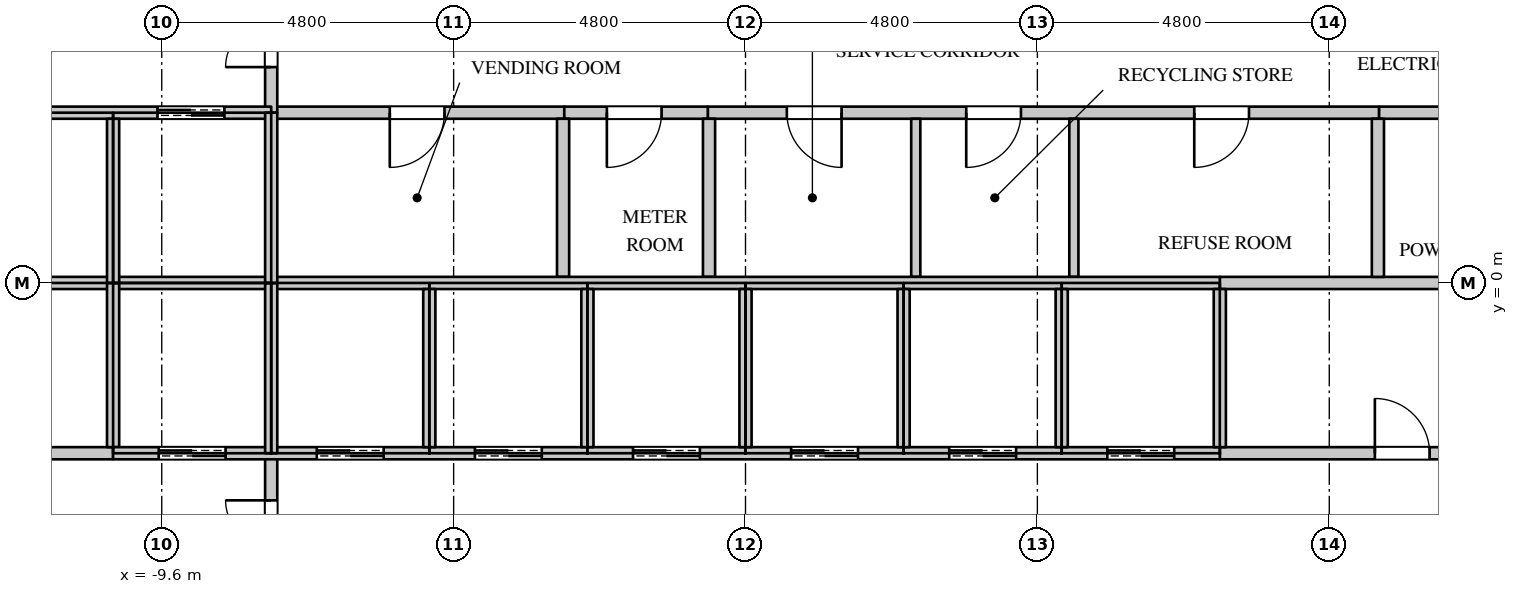
"""IFC4 building model, lengths in metres.
Left out: names, types, materials, properties, quantities, classifications, styles, units other than length and angle.
Written with IfcOpenShell. Run it as: python <this file> out.ifc"""

import sys

from ifc_helpers import new_model, si_unit, direction, frame, frame_2d, origin, place, context, subcontext, project, spatial, rectangle, extrude, element, fill, save


model = new_model("IFC4")
c1 = context("Model", 3, precision=1e-05, world=origin(), true_north=direction((0.0, 1.0)))
c2 = subcontext(c1, "Body", "Model", "MODEL_VIEW")
j1 = project(units=[si_unit("LENGTHUNIT", "METRE"), si_unit("PLANEANGLEUNIT", "RADIAN")], contexts=[c1])
p1 = place(None, origin())
s1 = spatial("IfcSite", under=j1, at=p1, CompositionType="ELEMENT")
p2 = place(p1, origin())
s2 = spatial("IfcBuilding", under=s1, at=p2, CompositionType="ELEMENT")
p3 = place(p2, frame((0.0, 0.0, 226.5)))
s3 = spatial("IfcBuildingStorey", under=s2, at=p3, CompositionType="ELEMENT", Elevation=226.5)
p4 = place(p3, frame((-7.8, 2.8, 0.0), z_axis=(0.0, 0.0, 1.0), x_axis=(1.0, 0.0, 0.0)))
e1 = element("IfcWall", 1, at=p4, inside=s3, PredefinedType="PARTITIONING", context=c2, shape_type="SweptSolid", body=[
    extrude(rectangle(XDim=4.82, YDim=0.2, at=frame_2d((2.41, 0.0))), origin(), (0.0, 0.0, 1.0), 3.95),
])
p5 = place(p4, frame((1.95, 0.0, 0.0)))
e2 = element("IfcOpeningElement", 2, at=p5, cuts=e1, PredefinedType="OPENING", context=c2, shape_type="SweptSolid", body=[
    extrude(rectangle(XDim=0.9, YDim=2.2, at=frame_2d((0.45, 1.1))), frame((0.0, 0.11, 0.0), z_axis=(0.0, -1.0, 0.0), x_axis=(1.0, 0.0, 0.0)), (0.0, 0.0, 1.0), 0.22),
])
p6 = place(p3, frame((-7.8, -8.075, 0.0), z_axis=(0.0, 0.0, 1.0), x_axis=(0.0, 1.0, 0.0)))
e3 = element("IfcWall", 3, at=p6, inside=s3, PredefinedType="PARTITIONING", context=c2, shape_type="SweptSolid", body=[
    extrude(rectangle(XDim=5.275, YDim=0.2, at=frame_2d((2.637, 0.0))), origin(), (0.0, 0.0, 1.0), 3.95),
])
p7 = place(p6, frame((3.0, 0.0, 0.0)))
e4 = element("IfcOpeningElement", 4, at=p7, cuts=e3, PredefinedType="OPENING", context=c2, shape_type="SweptSolid", body=[
    extrude(rectangle(XDim=1.5, YDim=2.4, at=frame_2d((0.75, 1.2))), frame((0.0, 0.11, 0.0), z_axis=(0.0, -1.0, 0.0), x_axis=(1.0, 0.0, 0.0)), (0.0, 0.0, 1.0), 0.22),
])
p8 = place(p3, frame((-7.8, 2.8, 0.0), z_axis=(0.0, 0.0, 1.0), x_axis=(0.0, 1.0, 0.0)))
e5 = element("IfcWall", 5, at=p8, inside=s3, PredefinedType="PARTITIONING", context=c2, shape_type="SweptSolid", body=[
    extrude(rectangle(XDim=5.275, YDim=0.2, at=frame_2d((2.637, 0.0))), origin(), (0.0, 0.0, 1.0), 3.95),
])
p9 = place(p8, frame((0.75, 0.0, 0.0)))
e6 = element("IfcOpeningElement", 6, at=p9, cuts=e5, PredefinedType="OPENING", context=c2, shape_type="SweptSolid", body=[
    extrude(rectangle(XDim=1.5, YDim=2.4, at=frame_2d((0.75, 1.2))), frame((0.0, 0.11, 0.0), z_axis=(0.0, -1.0, 0.0), x_axis=(1.0, 0.0, 0.0)), (0.0, 0.0, 1.0), 0.22),
])
p10 = place(p3, frame((-0.62, 2.8, 0.0), z_axis=(0.0, 0.0, 1.0), x_axis=(1.0, 0.0, 0.0)))
e7 = element("IfcWall", 7, at=p10, inside=s3, PredefinedType="PARTITIONING", context=c2, shape_type="SweptSolid", body=[
    extrude(rectangle(XDim=11.04, YDim=0.2, at=frame_2d((5.52, 0.0))), origin(), (0.0, 0.0, 1.0), 3.95),
])
p11 = place(p10, frame((1.3, 0.0, 0.0)))
e8 = element("IfcOpeningElement", 8, at=p11, cuts=e7, PredefinedType="OPENING", context=c2, shape_type="SweptSolid", body=[
    extrude(rectangle(XDim=0.9, YDim=2.2, at=frame_2d((0.45, 1.1))), frame((0.0, 0.11, 0.0), z_axis=(0.0, -1.0, 0.0), x_axis=(1.0, 0.0, 0.0)), (0.0, 0.0, 1.0), 0.22),
])
p12 = place(p10, frame((4.25, 0.0, 0.0)))
e9 = element("IfcOpeningElement", 9, at=p12, cuts=e7, PredefinedType="OPENING", context=c2, shape_type="SweptSolid", body=[
    extrude(rectangle(XDim=0.9, YDim=2.2, at=frame_2d((0.45, 1.1))), frame((0.0, 0.11, 0.0), z_axis=(0.0, -1.0, 0.0), x_axis=(1.0, 0.0, 0.0)), (0.0, 0.0, 1.0), 0.22),
])
p13 = place(p10, frame((8.0, 0.0, 0.0)))
e10 = element("IfcOpeningElement", 10, at=p13, cuts=e7, PredefinedType="OPENING", context=c2, shape_type="SweptSolid", body=[
    extrude(rectangle(XDim=0.9, YDim=2.2, at=frame_2d((0.45, 1.1))), frame((0.0, 0.11, 0.0), z_axis=(0.0, -1.0, 0.0), x_axis=(1.0, 0.0, 0.0)), (0.0, 0.0, 1.0), 0.22),
])
for number, where, z_axis, x_axis in (
    (11, (2.8, 0.1, 0.0), (0.0, 0.0, 1.0), (0.0, 1.0, 0.0)),
    (12, (5.4, 0.1, 0.0), (0.0, 0.0, 1.0), (0.0, 1.0, 0.0)),
):
    element("IfcWall", number, at=place(p3, frame(where, z_axis=z_axis, x_axis=x_axis)), inside=s3, PredefinedType="PARTITIONING", context=c2, shape_type="SweptSolid", body=[
        extrude(rectangle(XDim=2.6, YDim=0.15, at=frame_2d((1.3, 0.0))), origin(), (0.0, 0.0, 1.0), 3.95),
    ])
p14 = place(p3, frame((-13.77, -2.8, 0.0), z_axis=(0.0, 0.0, 1.0), x_axis=(1.0, 0.0, 0.0)))
e13 = element("IfcWall", 13, at=p14, inside=s3, PredefinedType="PARTITIONING", context=c2, shape_type="SweptSolid", body=[
    extrude(rectangle(XDim=3.37, YDim=0.2, at=frame_2d((1.685, 0.0))), origin(), (0.0, 0.0, 1.0), 3.95),
])
p15 = place(p14, frame((1.35, 0.0, 0.0)))
e14 = element("IfcOpeningElement", 14, at=p15, cuts=e13, PredefinedType="OPENING", context=c2, shape_type="SweptSolid", body=[
    extrude(rectangle(XDim=0.6, YDim=2.0, at=frame_2d((0.3, 1.0))), frame((0.0, 0.11, 0.0), z_axis=(0.0, -1.0, 0.0), x_axis=(1.0, 0.0, 0.0)), (0.0, 0.0, 1.0), 0.22),
])
p16 = place(p3, frame((-2.98, 2.8, 0.0), z_axis=(0.0, 0.0, 1.0), x_axis=(1.0, 0.0, 0.0)))
e15 = element("IfcWall", 15, at=p16, inside=s3, PredefinedType="PARTITIONING", context=c2, shape_type="SweptSolid", body=[
    extrude(rectangle(XDim=2.36, YDim=0.2, at=frame_2d((1.18, 0.0))), origin(), (0.0, 0.0, 1.0), 3.95),
])
p17 = place(p16, frame((0.7, 0.0, 0.0)))
e16 = element("IfcOpeningElement", 16, at=p17, cuts=e15, PredefinedType="OPENING", context=c2, shape_type="SweptSolid", body=[
    extrude(rectangle(XDim=0.9, YDim=2.2, at=frame_2d((0.45, 1.1))), frame((0.0, 0.11, 0.0), z_axis=(0.0, -1.0, 0.0), x_axis=(1.0, 0.0, 0.0)), (0.0, 0.0, 1.0), 0.22),
])
for number, where, z_axis, x_axis in (
    (17, (-3.0, 0.1, 0.0), (0.0, 0.0, 1.0), (0.0, 1.0, 0.0)),
    (18, (-0.6, 0.1, 0.0), (0.0, 0.0, 1.0), (0.0, 1.0, 0.0)),
):
    element("IfcWall", number, at=place(p3, frame(where, z_axis=z_axis, x_axis=x_axis)), inside=s3, PredefinedType="PARTITIONING", context=c2, shape_type="SweptSolid", body=[
        extrude(rectangle(XDim=2.6, YDim=0.2, at=frame_2d((1.3, 0.0))), origin(), (0.0, 0.0, 1.0), 3.95),
    ])
p18 = place(p3, frame((7.8, -2.8, 0.0), z_axis=(0.0, 0.0, 1.0), x_axis=(1.0, 0.0, 0.0)))
e19 = element("IfcWall", 19, at=p18, inside=s3, PredefinedType="PARTITIONING", context=c2, shape_type="SweptSolid", body=[
    extrude(rectangle(XDim=5.97, YDim=0.2, at=frame_2d((2.985, 0.0))), origin(), (0.0, 0.0, 1.0), 3.95),
])
p19 = place(p18, frame((2.55, 0.0, 0.0)))
e20 = element("IfcOpeningElement", 20, at=p19, cuts=e19, PredefinedType="OPENING", context=c2, shape_type="SweptSolid", body=[
    extrude(rectangle(XDim=0.9, YDim=2.2, at=frame_2d((0.45, 1.1))), frame((0.0, 0.11, 0.0), z_axis=(0.0, -1.0, 0.0), x_axis=(1.0, 0.0, 0.0)), (0.0, 0.0, 1.0), 0.22),
])
p20 = place(p3, frame((7.8, 0.0, 0.0), z_axis=(0.0, 0.0, 1.0), x_axis=(1.0, 0.0, 0.0)))
e21 = element("IfcWall", 21, at=p20, inside=s3, PredefinedType="PARTITIONING", context=c2, shape_type="SweptSolid", body=[
    extrude(rectangle(XDim=5.97, YDim=0.2, at=frame_2d((2.985, 0.0))), origin(), (0.0, 0.0, 1.0), 3.95),
])
p21 = place(p3, frame((10.42, 2.8, 0.0), z_axis=(0.0, 0.0, 1.0), x_axis=(1.0, 0.0, 0.0)))
e22 = element("IfcWall", 22, at=p21, inside=s3, PredefinedType="PARTITIONING", context=c2, shape_type="SweptSolid", body=[
    extrude(rectangle(XDim=3.35, YDim=0.2, at=frame_2d((1.675, 0.0))), origin(), (0.0, 0.0, 1.0), 3.95),
])
p22 = place(p21, frame((1.35, 0.0, 0.0)))
e23 = element("IfcOpeningElement", 23, at=p22, cuts=e22, PredefinedType="OPENING", context=c2, shape_type="SweptSolid", body=[
    extrude(rectangle(XDim=0.6, YDim=2.0, at=frame_2d((0.3, 1.0))), frame((0.0, 0.11, 0.0), z_axis=(0.0, -1.0, 0.0), x_axis=(1.0, 0.0, 0.0)), (0.0, 0.0, 1.0), 0.22),
])
p23 = place(p3, frame((10.4, 0.1, 0.0), z_axis=(0.0, 0.0, 1.0), x_axis=(0.0, 1.0, 0.0)))
e24 = element("IfcWall", 24, at=p23, inside=s3, PredefinedType="PARTITIONING", context=c2, shape_type="SweptSolid", body=[
    extrude(rectangle(XDim=2.6, YDim=0.2, at=frame_2d((1.3, 0.0))), origin(), (0.0, 0.0, 1.0), 3.95),
])
p24 = place(p3, frame((-13.77, 0.0, 0.0), z_axis=(0.0, 0.0, 1.0), x_axis=(1.0, 0.0, 0.0)))
e25 = element("IfcWall", 25, at=p24, inside=s3, PredefinedType="PARTITIONING", context=c2, shape_type="SweptSolid", body=[
    extrude(rectangle(XDim=21.57, YDim=0.2, at=frame_2d((10.785, 0.0))), origin(), (0.0, 0.0, 1.0), 3.95),
])
p25 = place(p3, frame((-13.77, 2.8, 0.0), z_axis=(0.0, 0.0, 1.0), x_axis=(1.0, 0.0, 0.0)))
e26 = element("IfcWall", 26, at=p25, inside=s3, PredefinedType="PARTITIONING", context=c2, shape_type="SweptSolid", body=[
    extrude(rectangle(XDim=5.97, YDim=0.2, at=frame_2d((2.985, 0.0))), origin(), (0.0, 0.0, 1.0), 3.95),
])
p26 = place(p25, frame((1.1, 0.0, 0.0)))
e27 = element("IfcOpeningElement", 27, at=p26, cuts=e26, PredefinedType="OPENING", context=c2, shape_type="SweptSolid", body=[
    extrude(rectangle(XDim=1.1, YDim=2.2, at=frame_2d((0.55, 1.1))), frame((0.0, 0.11, 0.0), z_axis=(0.0, -1.0, 0.0), x_axis=(1.0, 0.0, 0.0)), (0.0, 0.0, 1.0), 0.22),
])
p27 = place(p25, frame((4.1, 0.0, 0.0)))
e28 = element("IfcOpeningElement", 28, at=p27, cuts=e26, PredefinedType="OPENING", context=c2, shape_type="SweptSolid", body=[
    extrude(rectangle(XDim=1.1, YDim=2.2, at=frame_2d((0.55, 1.1))), frame((0.0, 0.11, 0.0), z_axis=(0.0, -1.0, 0.0), x_axis=(1.0, 0.0, 0.0)), (0.0, 0.0, 1.0), 0.22),
])
p28 = place(p3, frame((-10.4, -2.7, 0.0), z_axis=(0.0, 0.0, 1.0), x_axis=(0.0, 1.0, 0.0)))
e29 = element("IfcWall", 29, at=p28, inside=s3, PredefinedType="PARTITIONING", context=c2, shape_type="SweptSolid", body=[
    extrude(rectangle(XDim=2.7, YDim=0.2, at=frame_2d((1.35, 0.0))), origin(), (0.0, 0.0, 1.0), 3.95),
])
p29 = place(p3, frame((-10.4, -2.8, 0.0), z_axis=(0.0, 0.0, 1.0), x_axis=(1.0, 0.0, 0.0)))
e30 = element("IfcWall", 30, at=p29, inside=s3, PredefinedType="PARTITIONING", context=c2, shape_type="SweptSolid", body=[
    extrude(rectangle(XDim=18.2, YDim=0.2, at=frame_2d((9.1, 0.0))), origin(), (0.0, 0.0, 1.0), 3.95),
])
p30 = place(p29, frame((0.75, 0.0, 0.0)))
e31 = element("IfcOpeningElement", 31, at=p30, cuts=e30, PredefinedType="OPENING", context=c2, shape_type="SweptSolid", body=[
    extrude(rectangle(XDim=1.1, YDim=2.2, at=frame_2d((0.55, 1.1))), frame((0.0, 0.11, 0.0), z_axis=(0.0, -1.0, 0.0), x_axis=(1.0, 0.0, 0.0)), (0.0, 0.0, 1.0), 0.22),
])
p31 = place(p29, frame((3.35, 0.0, 0.0)))
e32 = element("IfcOpeningElement", 32, at=p31, cuts=e30, PredefinedType="OPENING", context=c2, shape_type="SweptSolid", body=[
    extrude(rectangle(XDim=1.1, YDim=2.2, at=frame_2d((0.55, 1.1))), frame((0.0, 0.11, 0.0), z_axis=(0.0, -1.0, 0.0), x_axis=(1.0, 0.0, 0.0)), (0.0, 0.0, 1.0), 0.22),
])
p32 = place(p29, frame((5.95, 0.0, 0.0)))
e33 = element("IfcOpeningElement", 33, at=p32, cuts=e30, PredefinedType="OPENING", context=c2, shape_type="SweptSolid", body=[
    extrude(rectangle(XDim=1.1, YDim=2.2, at=frame_2d((0.55, 1.1))), frame((0.0, 0.11, 0.0), z_axis=(0.0, -1.0, 0.0), x_axis=(1.0, 0.0, 0.0)), (0.0, 0.0, 1.0), 0.22),
])
p33 = place(p29, frame((8.55, 0.0, 0.0)))
e34 = element("IfcOpeningElement", 34, at=p33, cuts=e30, PredefinedType="OPENING", context=c2, shape_type="SweptSolid", body=[
    extrude(rectangle(XDim=1.1, YDim=2.2, at=frame_2d((0.55, 1.1))), frame((0.0, 0.11, 0.0), z_axis=(0.0, -1.0, 0.0), x_axis=(1.0, 0.0, 0.0)), (0.0, 0.0, 1.0), 0.22),
])
p34 = place(p29, frame((11.15, 0.0, 0.0)))
e35 = element("IfcOpeningElement", 35, at=p34, cuts=e30, PredefinedType="OPENING", context=c2, shape_type="SweptSolid", body=[
    extrude(rectangle(XDim=1.1, YDim=2.2, at=frame_2d((0.55, 1.1))), frame((0.0, 0.11, 0.0), z_axis=(0.0, -1.0, 0.0), x_axis=(1.0, 0.0, 0.0)), (0.0, 0.0, 1.0), 0.22),
])
p35 = place(p29, frame((13.75, 0.0, 0.0)))
e36 = element("IfcOpeningElement", 36, at=p35, cuts=e30, PredefinedType="OPENING", context=c2, shape_type="SweptSolid", body=[
    extrude(rectangle(XDim=1.1, YDim=2.2, at=frame_2d((0.55, 1.1))), frame((0.0, 0.11, 0.0), z_axis=(0.0, -1.0, 0.0), x_axis=(1.0, 0.0, 0.0)), (0.0, 0.0, 1.0), 0.22),
])
p36 = place(p29, frame((16.35, 0.0, 0.0)))
e37 = element("IfcOpeningElement", 37, at=p36, cuts=e30, PredefinedType="OPENING", context=c2, shape_type="SweptSolid", body=[
    extrude(rectangle(XDim=1.1, YDim=2.2, at=frame_2d((0.55, 1.1))), frame((0.0, 0.11, 0.0), z_axis=(0.0, -1.0, 0.0), x_axis=(1.0, 0.0, 0.0)), (0.0, 0.0, 1.0), 0.22),
])
p37 = place(p3, frame((-10.4, 0.0, 0.0), z_axis=(0.0, 0.0, 1.0), x_axis=(0.0, 1.0, 0.0)))
e38 = element("IfcWall", 38, at=p37, inside=s3, PredefinedType="PARTITIONING", context=c2, shape_type="SweptSolid", body=[
    extrude(rectangle(XDim=2.7, YDim=0.2, at=frame_2d((1.35, 0.0))), origin(), (0.0, 0.0, 1.0), 3.95),
])
for number, where, z_axis, x_axis in (
    (39, (-7.8, -2.8, 0.0), (0.0, 0.0, 1.0), (0.0, 1.0, 0.0)),
    (40, (-7.8, 0.0, 0.0), (0.0, 0.0, 1.0), (0.0, 1.0, 0.0)),
):
    element("IfcWall", number, at=place(p3, frame(where, z_axis=z_axis, x_axis=x_axis)), inside=s3, PredefinedType="PARTITIONING", context=c2, shape_type="SweptSolid", body=[
        extrude(rectangle(XDim=2.8, YDim=0.2, at=frame_2d((1.4, 0.0))), origin(), (0.0, 0.0, 1.0), 3.95),
    ])
for number, where, z_axis, x_axis in (
    (41, (-5.2, -2.7, 0.0), (0.0, 0.0, 1.0), (0.0, 1.0, 0.0)),
    (42, (-2.6, -2.7, 0.0), (0.0, 0.0, 1.0), (0.0, 1.0, 0.0)),
    (43, (0.0, -2.7, 0.0), (0.0, 0.0, 1.0), (0.0, 1.0, 0.0)),
    (44, (2.6, -2.7, 0.0), (0.0, 0.0, 1.0), (0.0, 1.0, 0.0)),
    (45, (5.2, -2.7, 0.0), (0.0, 0.0, 1.0), (0.0, 1.0, 0.0)),
    (46, (7.8, -2.7, 0.0), (0.0, 0.0, 1.0), (0.0, 1.0, 0.0)),
):
    element("IfcWall", number, at=place(p3, frame(where, z_axis=z_axis, x_axis=x_axis)), inside=s3, PredefinedType="PARTITIONING", context=c2, shape_type="SweptSolid", body=[
        extrude(rectangle(XDim=2.6, YDim=0.2, at=frame_2d((1.3, 0.0))), origin(), (0.0, 0.0, 1.0), 3.95),
    ])
p38 = place(p19, origin())
e47 = element("IfcDoor", 47, at=p38, inside=s3, OperationType="SINGLE_SWING_LEFT", PredefinedType="DOOR", context=c2, shape_type="SweptSolid", body=[
    extrude(rectangle(XDim=0.9, YDim=2.2, at=frame_2d((0.45, 1.1))), frame((0.0, 0.025, 0.0), z_axis=(0.0, -1.0, 0.0), x_axis=(1.0, 0.0, 0.0)), (0.0, 0.0, 1.0), 0.05),
])
fill(e20, e47)
p39 = place(p5, origin())
e48 = element("IfcDoor", 48, at=p39, inside=s3, OperationType="SINGLE_SWING_RIGHT", PredefinedType="DOOR", context=c2, shape_type="SweptSolid", body=[
    extrude(rectangle(XDim=0.9, YDim=2.2, at=frame_2d((0.45, 1.1))), frame((0.0, 0.025, 0.0), z_axis=(0.0, -1.0, 0.0), x_axis=(1.0, 0.0, 0.0)), (0.0, 0.0, 1.0), 0.05),
])
fill(e2, e48)
p40 = place(p17, origin())
e49 = element("IfcDoor", 49, at=p40, inside=s3, OperationType="SINGLE_SWING_RIGHT", PredefinedType="DOOR", context=c2, shape_type="SweptSolid", body=[
    extrude(rectangle(XDim=0.9, YDim=2.2, at=frame_2d((0.45, 1.1))), frame((0.0, 0.025, 0.0), z_axis=(0.0, -1.0, 0.0), x_axis=(1.0, 0.0, 0.0)), (0.0, 0.0, 1.0), 0.05),
])
fill(e16, e49)
p41 = place(p11, origin())
e50 = element("IfcDoor", 50, at=p41, inside=s3, OperationType="SINGLE_SWING_LEFT", PredefinedType="DOOR", context=c2, shape_type="SweptSolid", body=[
    extrude(rectangle(XDim=0.9, YDim=2.2, at=frame_2d((0.45, 1.1))), frame((0.0, 0.025, 0.0), z_axis=(0.0, -1.0, 0.0), x_axis=(1.0, 0.0, 0.0)), (0.0, 0.0, 1.0), 0.05),
])
fill(e8, e50)
p42 = place(p12, origin())
e51 = element("IfcDoor", 51, at=p42, inside=s3, OperationType="SINGLE_SWING_RIGHT", PredefinedType="DOOR", context=c2, shape_type="SweptSolid", body=[
    extrude(rectangle(XDim=0.9, YDim=2.2, at=frame_2d((0.45, 1.1))), frame((0.0, 0.025, 0.0), z_axis=(0.0, -1.0, 0.0), x_axis=(1.0, 0.0, 0.0)), (0.0, 0.0, 1.0), 0.05),
])
fill(e9, e51)
p43 = place(p13, origin())
e52 = element("IfcDoor", 52, at=p43, inside=s3, OperationType="SINGLE_SWING_RIGHT", PredefinedType="DOOR", context=c2, shape_type="SweptSolid", body=[
    extrude(rectangle(XDim=0.9, YDim=2.2, at=frame_2d((0.45, 1.1))), frame((0.0, 0.025, 0.0), z_axis=(0.0, -1.0, 0.0), x_axis=(1.0, 0.0, 0.0)), (0.0, 0.0, 1.0), 0.05),
])
fill(e10, e52)
p44 = place(p27, origin())
e53 = element("IfcDoor", 53, at=p44, inside=s3, OperationType="DOUBLE_DOOR_SLIDING", PredefinedType="DOOR", context=c2, shape_type="SweptSolid", body=[
    extrude(rectangle(XDim=1.1, YDim=2.2, at=frame_2d((0.55, 1.1))), frame((0.0, 0.025, 0.0), z_axis=(0.0, -1.0, 0.0), x_axis=(1.0, 0.0, 0.0)), (0.0, 0.0, 1.0), 0.05),
])
fill(e28, e53)
p45 = place(p30, origin())
e54 = element("IfcDoor", 54, at=p45, inside=s3, OperationType="DOUBLE_DOOR_SLIDING", PredefinedType="DOOR", context=c2, shape_type="SweptSolid", body=[
    extrude(rectangle(XDim=1.1, YDim=2.2, at=frame_2d((0.55, 1.1))), frame((0.0, 0.025, 0.0), z_axis=(0.0, -1.0, 0.0), x_axis=(1.0, 0.0, 0.0)), (0.0, 0.0, 1.0), 0.05),
])
fill(e31, e54)
p46 = place(p31, origin())
e55 = element("IfcDoor", 55, at=p46, inside=s3, OperationType="DOUBLE_DOOR_SLIDING", PredefinedType="DOOR", context=c2, shape_type="SweptSolid", body=[
    extrude(rectangle(XDim=1.1, YDim=2.2, at=frame_2d((0.55, 1.1))), frame((0.0, 0.025, 0.0), z_axis=(0.0, -1.0, 0.0), x_axis=(1.0, 0.0, 0.0)), (0.0, 0.0, 1.0), 0.05),
])
fill(e32, e55)
p47 = place(p32, origin())
e56 = element("IfcDoor", 56, at=p47, inside=s3, OperationType="DOUBLE_DOOR_SLIDING", PredefinedType="DOOR", context=c2, shape_type="SweptSolid", body=[
    extrude(rectangle(XDim=1.1, YDim=2.2, at=frame_2d((0.55, 1.1))), frame((0.0, 0.025, 0.0), z_axis=(0.0, -1.0, 0.0), x_axis=(1.0, 0.0, 0.0)), (0.0, 0.0, 1.0), 0.05),
])
fill(e33, e56)
p48 = place(p33, origin())
e57 = element("IfcDoor", 57, at=p48, inside=s3, OperationType="DOUBLE_DOOR_SLIDING", PredefinedType="DOOR", context=c2, shape_type="SweptSolid", body=[
    extrude(rectangle(XDim=1.1, YDim=2.2, at=frame_2d((0.55, 1.1))), frame((0.0, 0.025, 0.0), z_axis=(0.0, -1.0, 0.0), x_axis=(1.0, 0.0, 0.0)), (0.0, 0.0, 1.0), 0.05),
])
fill(e34, e57)
p49 = place(p34, origin())
e58 = element("IfcDoor", 58, at=p49, inside=s3, OperationType="DOUBLE_DOOR_SLIDING", PredefinedType="DOOR", context=c2, shape_type="SweptSolid", body=[
    extrude(rectangle(XDim=1.1, YDim=2.2, at=frame_2d((0.55, 1.1))), frame((0.0, 0.025, 0.0), z_axis=(0.0, -1.0, 0.0), x_axis=(1.0, 0.0, 0.0)), (0.0, 0.0, 1.0), 0.05),
])
fill(e35, e58)
p50 = place(p35, origin())
e59 = element("IfcDoor", 59, at=p50, inside=s3, OperationType="DOUBLE_DOOR_SLIDING", PredefinedType="DOOR", context=c2, shape_type="SweptSolid", body=[
    extrude(rectangle(XDim=1.1, YDim=2.2, at=frame_2d((0.55, 1.1))), frame((0.0, 0.025, 0.0), z_axis=(0.0, -1.0, 0.0), x_axis=(1.0, 0.0, 0.0)), (0.0, 0.0, 1.0), 0.05),
])
fill(e36, e59)
p51 = place(p36, origin())
e60 = element("IfcDoor", 60, at=p51, inside=s3, OperationType="DOUBLE_DOOR_SLIDING", PredefinedType="DOOR", context=c2, shape_type="SweptSolid", body=[
    extrude(rectangle(XDim=1.1, YDim=2.2, at=frame_2d((0.55, 1.1))), frame((0.0, 0.025, 0.0), z_axis=(0.0, -1.0, 0.0), x_axis=(1.0, 0.0, 0.0)), (0.0, 0.0, 1.0), 0.05),
])
fill(e37, e60)
p52 = place(p9, origin())
e61 = element("IfcDoor", 61, at=p52, inside=s3, OperationType="DOUBLE_DOOR_SINGLE_SWING", PredefinedType="DOOR", context=c2, shape_type="SweptSolid", body=[
    extrude(rectangle(XDim=1.5, YDim=2.4, at=frame_2d((0.75, 1.2))), frame((0.0, 0.025, 0.0), z_axis=(0.0, -1.0, 0.0), x_axis=(1.0, 0.0, 0.0)), (0.0, 0.0, 1.0), 0.05),
])
fill(e6, e61)
p53 = place(p7, origin())
e62 = element("IfcDoor", 62, at=p53, inside=s3, OperationType="DOUBLE_DOOR_SINGLE_SWING", PredefinedType="DOOR", context=c2, shape_type="SweptSolid", body=[
    extrude(rectangle(XDim=1.5, YDim=2.4, at=frame_2d((0.75, 1.2))), frame((0.0, 0.025, 0.0), z_axis=(0.0, -1.0, 0.0), x_axis=(1.0, 0.0, 0.0)), (0.0, 0.0, 1.0), 0.05),
])
fill(e4, e62)
save(model, sys.argv[1])
